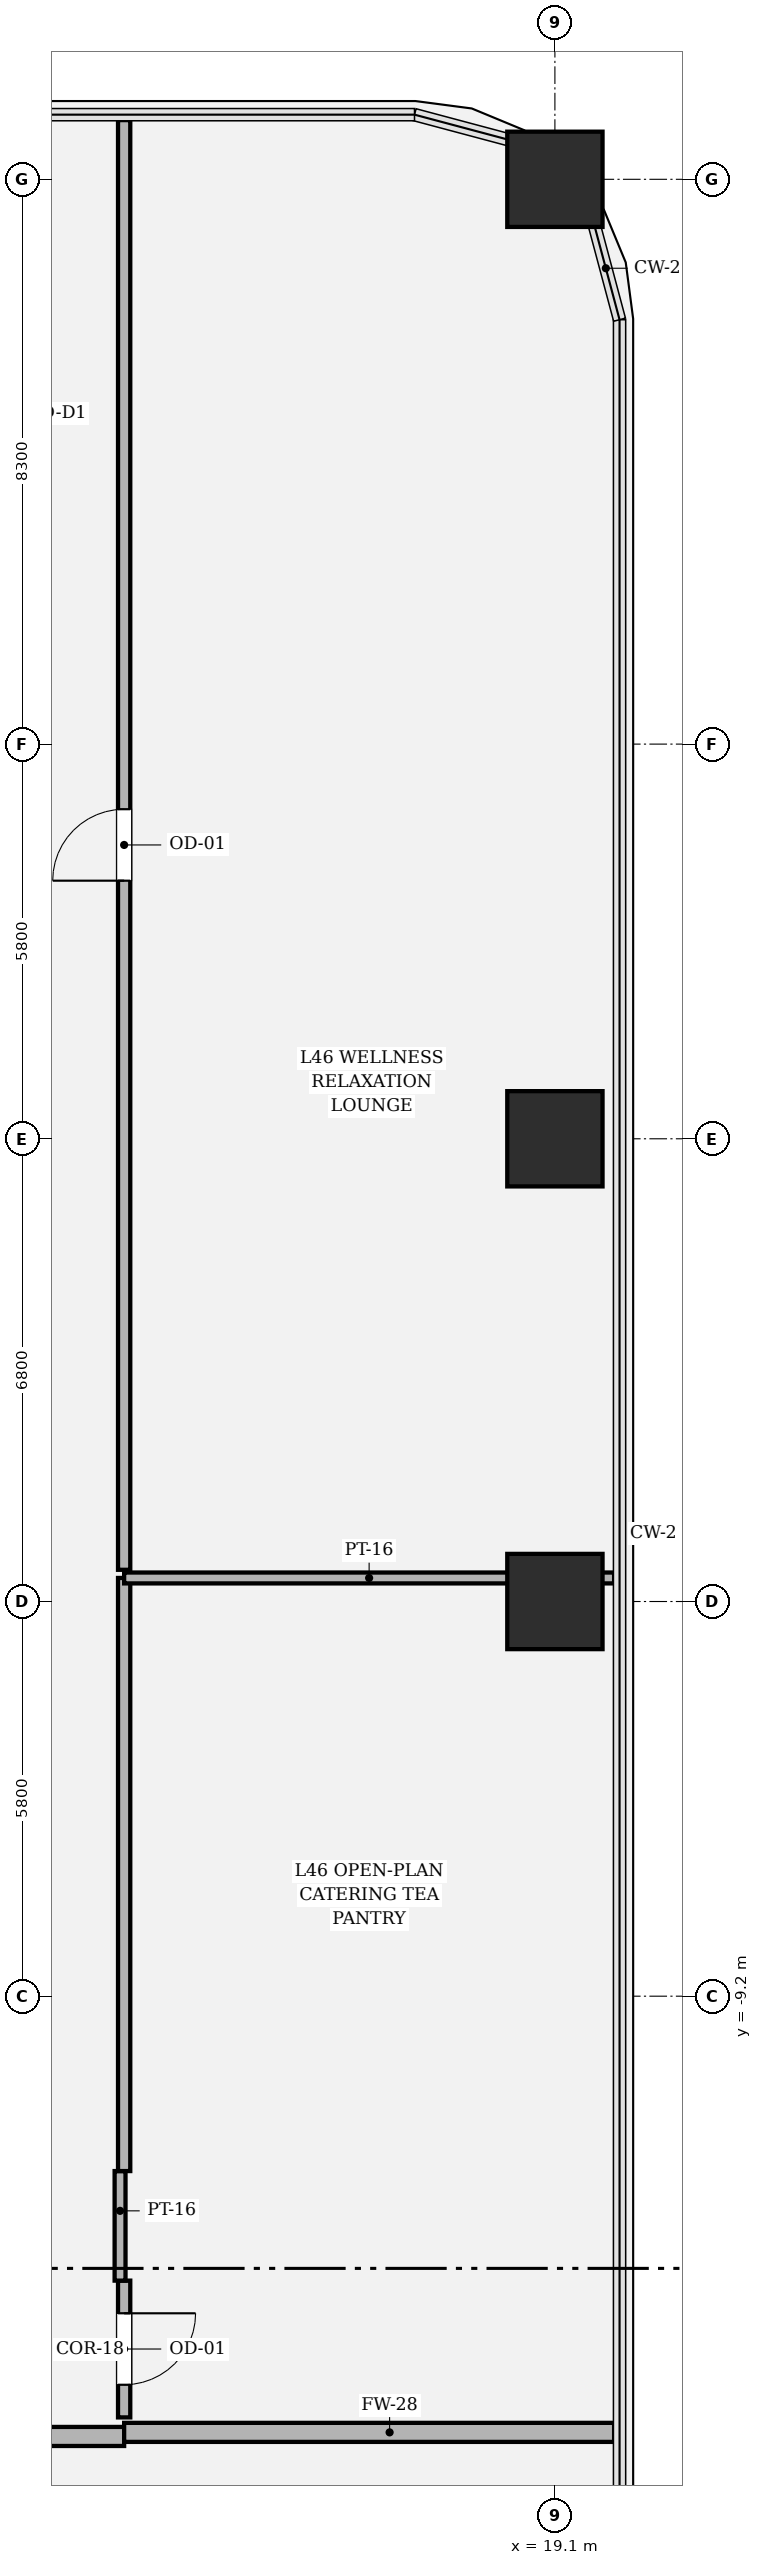
"""IFC4 building model, lengths in metres.
Left out: names, types, materials, properties, quantities, classifications, styles, units other than length and angle.
Written with IfcOpenShell. Run it as: python <this file> out.ifc"""

import sys

from ifc_helpers import new_model, si_unit, direction, frame, frame_2d, origin, origin_2d, place, context, subcontext, project, spatial, rectangle, hollow_rectangle, extrude, element, fill, save


model = new_model("IFC4")
c1 = context("Model", 3, precision=1e-05, world=origin(), true_north=direction((0.0, 1.0)))
c2 = subcontext(c1, "Body", "Model", "MODEL_VIEW")
j1 = project(units=[si_unit("LENGTHUNIT", "METRE"), si_unit("PLANEANGLEUNIT", "RADIAN")], contexts=[c1])
p1 = place(None, origin())
s1 = spatial("IfcSite", under=j1, at=p1, CompositionType="ELEMENT")
p2 = place(p1, origin())
s2 = spatial("IfcBuilding", under=s1, at=p2, CompositionType="ELEMENT")
p3 = place(p2, frame((0.0, 0.0, 196.5)))
s3 = spatial("IfcBuildingStorey", under=s2, at=p3, CompositionType="ELEMENT", Elevation=196.5)
for number, where, z_axis, x_axis in (
    (1, (19.1, -3.4, 0.0), (0.0, 0.0, 1.0), (1.0, 0.0, 0.0)),
    (2, (19.1, 3.4, 0.0), (0.0, 0.0, 1.0), (1.0, 0.0, 0.0)),
    (3, (19.1, 17.5, 0.0), (0.0, 0.0, 1.0), (1.0, 0.0, 0.0)),
):
    element("IfcColumn", number, at=place(p3, frame(where, z_axis=z_axis, x_axis=x_axis)), inside=s3, PredefinedType="COLUMN", context=c2, shape_type="SweptSolid", body=[
        extrude(hollow_rectangle(XDim=1.4, YDim=1.4, WallThickness=0.042, at=origin_2d()), origin(), (0.0, 0.0, 1.0), 4.05),
    ])
p4 = place(p3, frame((1.2, -15.67, 0.0), z_axis=(0.0, 0.0, 1.0), x_axis=(1.0, 0.0, 0.0)))
e4 = element("IfcWall", 4, at=p4, inside=s3, PredefinedType="SOLIDWALL", context=c2, shape_type="SweptSolid", body=[
    extrude(rectangle(XDim=11.57, YDim=0.28, at=frame_2d((5.785, 0.0))), origin(), (0.0, 0.0, 1.0), 3.174),
])
p5 = place(p4, frame((4.935, 0.0, 0.0)))
e5 = element("IfcOpeningElement", 5, at=p5, cuts=e4, PredefinedType="OPENING", context=c2, shape_type="SweptSolid", body=[
    extrude(rectangle(XDim=1.7, YDim=2.3, at=frame_2d((0.85, 1.15))), frame((0.0, 0.15, 0.0), z_axis=(0.0, -1.0, 0.0), x_axis=(1.0, 0.0, 0.0)), (0.0, 0.0, 1.0), 0.3),
])
p6 = place(p3, frame((12.77, -15.61, 0.0), z_axis=(0.0, 0.0, 1.0), x_axis=(1.0, 0.0, 0.0)))
e6 = element("IfcWall", 6, at=p6, inside=s3, PredefinedType="SOLIDWALL", context=c2, shape_type="SweptSolid", body=[
    extrude(rectangle(XDim=7.2, YDim=0.28, at=frame_2d((3.6, 0.0))), origin(), (0.0, 0.0, 1.0), 3.174),
])
p7 = place(p3, frame((12.77, -15.39, 0.0), z_axis=(0.0, 0.0, 1.0), x_axis=(0.0, 1.0, 0.0)))
e7 = element("IfcWall", 7, at=p7, inside=s3, PredefinedType="PARTITIONING", context=c2, shape_type="SweptSolid", body=[
    extrude(rectangle(XDim=2.01, YDim=0.18, at=frame_2d((1.005, 0.0))), origin(), (0.0, 0.0, 1.0), 3.424),
])
p8 = place(p7, frame((0.48, 0.0, 0.0)))
e8 = element("IfcOpeningElement", 8, at=p8, cuts=e7, PredefinedType="OPENING", context=c2, shape_type="SweptSolid", body=[
    extrude(rectangle(XDim=1.05, YDim=2.2, at=frame_2d((0.525, 1.1))), frame((0.0, 0.1, 0.0), z_axis=(0.0, -1.0, 0.0), x_axis=(1.0, 0.0, 0.0)), (0.0, 0.0, 1.0), 0.2),
])
p9 = place(p3, frame((12.71, -13.38, 0.0), z_axis=(0.0, 0.0, 1.0), x_axis=(0.0, 1.0, 0.0)))
e9 = element("IfcWall", 9, at=p9, inside=s3, PredefinedType="PARTITIONING", context=c2, shape_type="SweptSolid", body=[
    extrude(rectangle(XDim=1.61, YDim=0.16, at=frame_2d((0.805, 0.0))), origin(), (0.0, 0.0, 1.0), 3.424),
])
p10 = place(p3, frame((12.77, -11.77, 0.0), z_axis=(0.0, 0.0, 1.0), x_axis=(0.0, 1.0, 0.0)))
e10 = element("IfcWall", 10, at=p10, inside=s3, PredefinedType="PARTITIONING", context=c2, shape_type="SweptSolid", body=[
    extrude(rectangle(XDim=8.716, YDim=0.18, at=frame_2d((4.358, 0.0))), origin(), (0.0, 0.0, 1.0), 3.174),
])
p11 = place(p3, frame((12.77, -3.054, 0.0), z_axis=(0.0, 0.0, 1.0), x_axis=(1.0, 0.0, 0.0)))
e11 = element("IfcWall", 11, at=p11, inside=s3, PredefinedType="PARTITIONING", context=c2, shape_type="SweptSolid", body=[
    extrude(rectangle(XDim=7.2, YDim=0.16, at=frame_2d((3.6, 0.0))), origin(), (0.0, 0.0, 1.0), 3.174),
])
p12 = place(p3, frame((12.77, -2.934, 0.0), z_axis=(0.0, 0.0, 1.0), x_axis=(0.0, 1.0, 0.0)))
e12 = element("IfcWall", 12, at=p12, inside=s3, PredefinedType="PARTITIONING", context=c2, shape_type="SweptSolid", body=[
    extrude(rectangle(XDim=21.304, YDim=0.18, at=frame_2d((10.652, 0.0))), origin(), (0.0, 0.0, 1.0), 3.174),
])
p13 = place(p12, frame((10.127, 0.0, 0.0)))
e13 = element("IfcOpeningElement", 13, at=p13, cuts=e12, PredefinedType="OPENING", context=c2, shape_type="SweptSolid", body=[
    extrude(rectangle(XDim=1.05, YDim=2.2, at=frame_2d((0.525, 1.1))), frame((0.0, 0.1, 0.0), z_axis=(0.0, -1.0, 0.0), x_axis=(1.0, 0.0, 0.0)), (0.0, 0.0, 1.0), 0.2),
])
p14 = place(p8, origin())
e14 = element("IfcDoor", 14, at=p14, inside=s3, OperationType="SINGLE_SWING_RIGHT", PredefinedType="DOOR", context=c2, shape_type="SweptSolid", body=[
    extrude(rectangle(XDim=1.05, YDim=2.2, at=frame_2d((0.525, 1.1))), frame((0.0, 0.025, 0.0), z_axis=(0.0, -1.0, 0.0), x_axis=(1.0, 0.0, 0.0)), (0.0, 0.0, 1.0), 0.05),
])
fill(e8, e14)
p15 = place(p13, origin())
e15 = element("IfcDoor", 15, at=p15, inside=s3, OperationType="SINGLE_SWING_LEFT", PredefinedType="DOOR", context=c2, shape_type="SweptSolid", body=[
    extrude(rectangle(XDim=1.05, YDim=2.2, at=frame_2d((0.525, 1.1))), frame((0.0, 0.025, 0.0), z_axis=(0.0, -1.0, 0.0), x_axis=(1.0, 0.0, 0.0)), (0.0, 0.0, 1.0), 0.05),
])
fill(e13, e15)
save(model, sys.argv[1])
